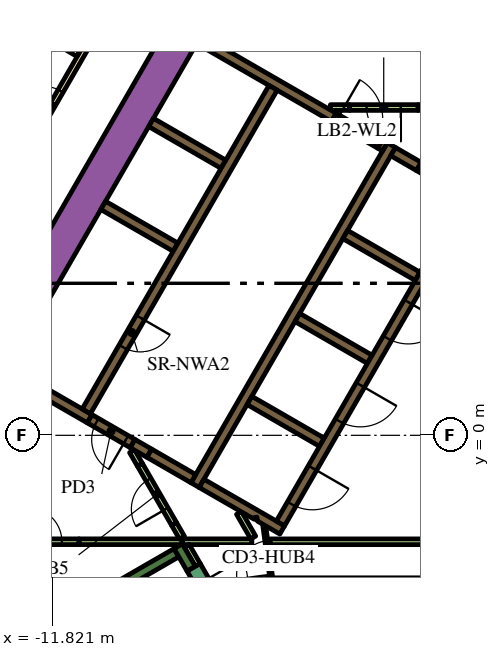
"""IFC4 building model, lengths in metres.
Left out: names, types, materials, properties, quantities, classifications, styles, units other than length and angle.
Written with IfcOpenShell. Run it as: python <this file> out.ifc"""

import sys

from ifc_helpers import new_model, si_unit, direction, frame, frame_2d, origin, place, context, subcontext, project, spatial, polyline, rectangle, outline, extrude, element, fill, save


model = new_model("IFC4")
c1 = context("Model", 3, precision=1e-05, world=origin(), true_north=direction((0.0, 1.0)))
c2 = subcontext(c1, "Body", "Model", "MODEL_VIEW")
j1 = project(units=[si_unit("LENGTHUNIT", "METRE"), si_unit("PLANEANGLEUNIT", "RADIAN")], contexts=[c1])
p1 = place(None, origin())
s1 = spatial("IfcSite", under=j1, at=p1, CompositionType="ELEMENT")
p2 = place(p1, origin())
s2 = spatial("IfcBuilding", under=s1, at=p2, CompositionType="ELEMENT")
p3 = place(p2, frame((0.0, 0.0, 54.9)))
s3 = spatial("IfcBuildingStorey", under=s2, at=p3, CompositionType="ELEMENT", Elevation=54.9)
p4 = place(p3, frame((-14.268, 0.387, 0.0), z_axis=(0.0, 0.0, 1.0), x_axis=(0.499994617707, 0.866028511231, 0.0)))
e1 = element("IfcWall", 1, at=p4, inside=s3, PredefinedType="SOLIDWALL", context=c2, shape_type="SweptSolid", body=[
    extrude(rectangle(XDim=18.817, YDim=0.9, at=frame_2d((9.409, 0.0))), origin(), (0.0, 0.0, 1.0), 3.9),
])
p5 = place(p3, frame((-12.134, -11.883, 0.0), z_axis=(0.0, 0.0, 1.0), x_axis=(-0.500005339912, 0.866022320763, 0.0)))
e2 = element("IfcWall", 2, at=p5, inside=s3, PredefinedType="SOLIDWALL", context=c2, shape_type="SweptSolid", body=[
    extrude(rectangle(XDim=9.488, YDim=0.9, at=frame_2d((4.744, 0.0))), origin(), (0.0, 0.0, 1.0), 3.9),
])
p6 = place(p3, frame((-14.44, -6.49, 0.0), z_axis=(0.0, 0.0, 1.0), x_axis=(0.866022966069, 0.500004222222, 0.0)))
e3 = element("IfcWall", 3, at=p6, inside=s3, PredefinedType="SOLIDWALL", context=c2, shape_type="SweptSolid", body=[
    extrude(rectangle(XDim=6.8, YDim=0.25, at=frame_2d((3.4, 0.0))), origin(), (0.0, 0.0, 1.0), 3.9),
])
p7 = place(p3, frame((-8.163, -3.511, 0.0), z_axis=(0.0, 0.0, 1.0), x_axis=(-0.500206266495, 0.865906283012, 0.0)))
e4 = element("IfcWall", 4, at=p7, inside=s3, PredefinedType="SOLIDWALL", context=c2, shape_type="SweptSolid", body=[
    extrude(rectangle(XDim=0.684, YDim=0.25, at=frame_2d((0.342, 0.0))), origin(), (0.0, 0.0, 1.0), 3.9),
])
p8 = place(p3, frame((-8.06, -1.311, 0.0), z_axis=(0.0, 0.0, 1.0), x_axis=(0.50000273126, 0.866023826885, 0.0)))
e5 = element("IfcWall", 5, at=p8, inside=s3, PredefinedType="SOLIDWALL", context=c2, shape_type="SweptSolid", body=[
    extrude(rectangle(XDim=10.33, YDim=0.25, at=frame_2d((5.165, 0.0))), origin(), (0.0, 0.0, 1.0), 3.9),
])
p9 = place(p3, frame((-1.819, 6.87, 0.0), z_axis=(0.0, 0.0, 1.0), x_axis=(-0.866294599386, 0.499533449405, 0.0)))
e6 = element("IfcWall", 6, at=p9, inside=s3, PredefinedType="SOLIDWALL", context=c2, shape_type="SweptSolid", body=[
    extrude(rectangle(XDim=0.41, YDim=0.25, at=frame_2d((0.205, 0.0))), origin(), (0.0, 0.0, 1.0), 3.9),
])
p10 = place(p3, frame((-2.849, 7.465, 0.0), z_axis=(0.0, 0.0, 1.0), x_axis=(0.865955664968, -0.500120771724, 0.0)))
e7 = element("IfcWall", 7, at=p10, inside=s3, PredefinedType="SOLIDWALL", context=c2, shape_type="SweptSolid", body=[
    extrude(rectangle(XDim=0.778, YDim=0.25, at=frame_2d((0.389, 0.0))), origin(), (0.0, 0.0, 1.0), 3.9),
])
for number, where, z_axis, x_axis in (
    (8, (-2.204, 4.182, 0.0), (0.0, 0.0, 1.0), (-0.866, 0.5, 0.0)),
    (9, (-5.369, 3.1, 0.0), (0.0, 0.0, 1.0), (0.866, -0.5, 0.0)),
    (10, (-4.724, -0.182, 0.0), (0.0, 0.0, 1.0), (-0.866, 0.5, 0.0)),
):
    element("IfcWall", number, at=place(p3, frame(where, z_axis=z_axis, x_axis=x_axis)), inside=s3, PredefinedType="SOLIDWALL", context=c2, shape_type="SweptSolid", body=[
        extrude(rectangle(XDim=2.2, YDim=0.25, at=frame_2d((1.1, 0.0))), origin(), (0.0, 0.0, 1.0), 3.9),
    ])
p11 = place(p3, origin())
e11 = element("IfcWall", 11, at=p11, inside=s3, PredefinedType="SOLIDWALL", context=c2, shape_type="SweptSolid", body=[
    extrude(outline(polyline([(-5.922, -2.257), (-5.922, -2.257), (-5.705, -2.382), (-5.83, -2.598), (-6.418, -2.258), (-6.433, -2.153), (-6.433, -2.153), (-6.433, -2.153), (-6.508, -2.163), (-6.508, -2.163), (-6.508, -2.163), (-6.501, -2.21), (-7.952, -1.373), (-7.827, -1.156), (-5.922, -2.257)])), origin(), (0.0, 0.0, 1.0), 3.9),
])
p12 = place(p3, frame((-9.708, -0.215, 0.0), z_axis=(0.0, 0.0, 1.0), x_axis=(0.866113839764, -0.499846793097, 0.0)))
e12 = element("IfcWall", 12, at=p12, inside=s3, PredefinedType="SOLIDWALL", context=c2, shape_type="SweptSolid", body=[
    extrude(rectangle(XDim=0.51, YDim=0.25, at=frame_2d((0.255, 0.0))), origin(), (0.0, 0.0, 1.0), 3.9),
])
p13 = place(p3, frame((-12.999, 1.685, 0.0), z_axis=(0.0, 0.0, 1.0), x_axis=(0.865996765544, -0.500049599607, 0.0)))
e13 = element("IfcWall", 13, at=p13, inside=s3, PredefinedType="SOLIDWALL", context=c2, shape_type="SweptSolid", body=[
    extrude(rectangle(XDim=2.498, YDim=0.25, at=frame_2d((1.249, 0.0))), origin(), (0.0, 0.0, 1.0), 3.9),
])
p14 = place(p3, frame((-9.265, -0.471, 0.0), z_axis=(0.0, 0.0, 1.0), x_axis=(0.865954634268, -0.500122556369, 0.0)))
e14 = element("IfcWall", 14, at=p14, inside=s3, PredefinedType="SOLIDWALL", context=c2, shape_type="SweptSolid", body=[
    extrude(rectangle(XDim=1.338, YDim=0.25, at=frame_2d((0.669, 0.0))), origin(), (0.0, 0.0, 1.0), 3.9),
])
e15 = element("IfcWall", 15, at=p11, inside=s3, PredefinedType="SOLIDWALL", context=c2, shape_type="SweptSolid", body=[
    extrude(outline(polyline([(-3.128, 7.481), (-3.259, 7.557), (-3.134, 7.773), (-3.003, 7.698), (-3.128, 7.481)])), origin(), (0.0, 0.0, 1.0), 3.9),
])
for number, where, z_axis, x_axis in (
    (16, (-8.574, 4.95, 0.0), (0.0, 0.0, 1.0), (-0.866, 0.5, 0.0)),
    (17, (-7.314, 7.132, 0.0), (0.0, 0.0, 1.0), (-0.866, 0.5, 0.0)),
):
    element("IfcWall", number, at=place(p3, frame(where, z_axis=z_axis, x_axis=x_axis)), inside=s3, PredefinedType="SOLIDWALL", context=c2, shape_type="SweptSolid", body=[
        extrude(rectangle(XDim=2.2, YDim=0.25, at=frame_2d((1.1, 0.0))), origin(), (0.0, 0.0, 1.0), 3.9),
    ])
p15 = place(p3, frame((-7.959, 10.415, 0.0), z_axis=(0.0, 0.0, 1.0), x_axis=(0.866020958405, -0.500007699544, 0.0)))
e18 = element("IfcWall", 18, at=p15, inside=s3, PredefinedType="SOLIDWALL", context=c2, shape_type="SweptSolid", body=[
    extrude(rectangle(XDim=4.1, YDim=0.25, at=frame_2d((2.05, 0.0))), origin(), (0.0, 0.0, 1.0), 3.9),
])
p16 = place(p3, frame((-8.395, -2.8, 0.0), z_axis=(0.0, 0.0, 1.0), x_axis=(1.0, 0.0, 0.0)))
e19 = element("IfcWall", 19, at=p16, inside=s3, PredefinedType="PARTITIONING", context=c2, shape_type="SweptSolid", body=[
    extrude(rectangle(XDim=1.828, YDim=0.15, at=frame_2d((0.914, 0.0))), origin(), (0.0, 0.0, 1.0), 2.75),
])
p17 = place(p3, frame((-11.115, -2.8, 0.0), z_axis=(0.0, 0.0, 1.0), x_axis=(1.0, 0.0, 0.0)))
e20 = element("IfcWall", 20, at=p17, inside=s3, PredefinedType="PARTITIONING", context=c2, shape_type="SweptSolid", body=[
    extrude(rectangle(XDim=2.708, YDim=0.15, at=frame_2d((1.354, 0.0))), origin(), (0.0, 0.0, 1.0), 2.75),
])
p18 = place(p3, frame((-6.531, -2.689, 0.0), z_axis=(0.0, 0.0, 1.0), x_axis=(-0.499967446111, 0.866044197965, 0.0)))
e21 = element("IfcWall", 21, at=p18, inside=s3, PredefinedType="PARTITIONING", context=c2, shape_type="SweptSolid", body=[
    extrude(rectangle(XDim=0.748, YDim=0.15, at=frame_2d((0.374, 0.0))), origin(), (0.0, 0.0, 1.0), 2.75),
])
p19 = place(p3, frame((-7.99, -3.412, 0.0), z_axis=(0.0, 0.0, 1.0), x_axis=(-0.500193841991, 0.86591346013, 0.0)))
e22 = element("IfcWall", 22, at=p19, inside=s3, PredefinedType="PARTITIONING", context=c2, shape_type="SweptSolid", body=[
    extrude(rectangle(XDim=0.583, YDim=0.15, at=frame_2d((0.292, 0.0))), origin(), (0.0, 0.0, 1.0), 2.75),
])
p20 = place(p3, frame((-8.612, -2.333, 0.0), z_axis=(0.0, 0.0, 1.0), x_axis=(0.500248216681, -0.86588204838, 0.0)))
e23 = element("IfcWall", 23, at=p20, inside=s3, PredefinedType="PARTITIONING", context=c2, shape_type="SweptSolid", body=[
    extrude(rectangle(XDim=0.415, YDim=0.15, at=frame_2d((0.208, 0.0))), origin(), (0.0, 0.0, 1.0), 2.75),
])
p21 = place(p3, frame((-6.086, -2.801, 0.0), z_axis=(0.0, 0.0, 1.0), x_axis=(1.0, 0.0, 0.0)))
e24 = element("IfcWall", 24, at=p21, inside=s3, PredefinedType="PARTITIONING", context=c2, shape_type="SweptSolid", body=[
    extrude(rectangle(XDim=7.524, YDim=0.15, at=frame_2d((3.762, 0.0))), origin(), (0.0, 0.0, 1.0), 2.75),
])
p22 = place(p3, frame((-9.512, -0.775, 0.0), z_axis=(0.0, 0.0, 1.0), x_axis=(-0.500080620599, 0.865978852456, 0.0)))
e25 = element("IfcWall", 25, at=p22, inside=s3, PredefinedType="PARTITIONING", context=c2, shape_type="SweptSolid", body=[
    extrude(rectangle(XDim=0.413, YDim=0.15, at=frame_2d((0.207, 0.0))), origin(), (0.0, 0.0, 1.0), 2.75),
])
p23 = place(p3, frame((-3.997, 8.625, 0.0), z_axis=(0.0, 0.0, 1.0), x_axis=(-1.0, 0.0, 0.0)))
e26 = element("IfcWall", 26, at=p23, inside=s3, PredefinedType="PARTITIONING", context=c2, shape_type="SweptSolid", body=[
    extrude(rectangle(XDim=0.502, YDim=0.15, at=frame_2d((0.251, 0.0))), origin(), (0.0, 0.0, 1.0), 2.75),
])
p24 = place(p3, frame((-2.196, 8.625, 0.0), z_axis=(0.0, 0.0, 1.0), x_axis=(1.0, 0.0, 0.0)))
e27 = element("IfcWall", 27, at=p24, inside=s3, PredefinedType="PARTITIONING", context=c2, shape_type="SweptSolid", body=[
    extrude(rectangle(XDim=1.146, YDim=0.15, at=frame_2d((0.573, 0.0))), origin(), (0.0, 0.0, 1.0), 2.75),
])
p25 = place(p3, frame((-6.008, 9.144, 0.0), z_axis=(0.0, 0.0, 1.0), x_axis=(-0.500006956611, -0.866021387346, 0.0)))
e28 = element("IfcWall", 28, at=p25, inside=s3, PredefinedType="SOLIDWALL", context=c2, shape_type="SweptSolid", body=[
    extrude(rectangle(XDim=9.83, YDim=0.25, at=frame_2d((4.915, 0.0))), origin(), (0.0, 0.0, 1.0), 3.9),
])
p26 = place(p25, frame((6.985, 0.0, 0.0)))
e29 = element("IfcOpeningElement", 29, at=p26, cuts=e28, PredefinedType="OPENING", context=c2, shape_type="SweptSolid", body=[
    extrude(rectangle(XDim=0.9, YDim=2.1, at=frame_2d((0.45, 1.05))), frame((0.0, 0.135, 0.0), z_axis=(0.0, -1.0, 0.0), x_axis=(1.0, 0.0, 0.0)), (0.0, 0.0, 1.0), 0.27),
])
p27 = place(p3, frame((-0.898, 6.194, 0.0), z_axis=(0.0, 0.0, 1.0), x_axis=(-0.499996202215, -0.866027596426, 0.0)))
e30 = element("IfcWall", 30, at=p27, inside=s3, PredefinedType="SOLIDWALL", context=c2, shape_type="SweptSolid", body=[
    extrude(rectangle(XDim=9.83, YDim=0.25, at=frame_2d((4.915, 0.0))), origin(), (0.0, 0.0, 1.0), 3.9),
])
p28 = place(p27, frame((0.585, 0.0, 0.0)))
e31 = element("IfcOpeningElement", 31, at=p28, cuts=e30, PredefinedType="OPENING", context=c2, shape_type="SweptSolid", body=[
    extrude(rectangle(XDim=1.1, YDim=2.1, at=frame_2d((0.55, 1.05))), frame((0.0, 0.135, 0.0), z_axis=(0.0, -1.0, 0.0), x_axis=(1.0, 0.0, 0.0)), (0.0, 0.0, 1.0), 0.27),
])
p29 = place(p27, frame((3.105, 0.0, 0.0)))
e32 = element("IfcOpeningElement", 32, at=p29, cuts=e30, PredefinedType="OPENING", context=c2, shape_type="SweptSolid", body=[
    extrude(rectangle(XDim=1.1, YDim=2.1, at=frame_2d((0.55, 1.05))), frame((0.0, 0.135, 0.0), z_axis=(0.0, -1.0, 0.0), x_axis=(1.0, 0.0, 0.0)), (0.0, 0.0, 1.0), 0.27),
])
p30 = place(p27, frame((5.625, 0.0, 0.0)))
e33 = element("IfcOpeningElement", 33, at=p30, cuts=e30, PredefinedType="OPENING", context=c2, shape_type="SweptSolid", body=[
    extrude(rectangle(XDim=1.1, YDim=2.1, at=frame_2d((0.55, 1.05))), frame((0.0, 0.135, 0.0), z_axis=(0.0, -1.0, 0.0), x_axis=(1.0, 0.0, 0.0)), (0.0, 0.0, 1.0), 0.27),
])
p31 = place(p27, frame((8.145, 0.0, 0.0)))
e34 = element("IfcOpeningElement", 34, at=p31, cuts=e30, PredefinedType="OPENING", context=c2, shape_type="SweptSolid", body=[
    extrude(rectangle(XDim=1.1, YDim=2.1, at=frame_2d((0.55, 1.05))), frame((0.0, 0.135, 0.0), z_axis=(0.0, -1.0, 0.0), x_axis=(1.0, 0.0, 0.0)), (0.0, 0.0, 1.0), 0.27),
])
p32 = place(p3, frame((-2.196, 8.625, 0.0), z_axis=(0.0, 0.0, 1.0), x_axis=(-1.0, 0.0, 0.0)))
e35 = element("IfcWall", 35, at=p32, inside=s3, PredefinedType="PARTITIONING", context=c2, shape_type="SweptSolid", body=[
    extrude(rectangle(XDim=1.8, YDim=0.15, at=frame_2d((0.9, 0.0))), origin(), (0.0, 0.0, 1.0), 2.75),
])
p33 = place(p32, frame((0.45, 0.0, 0.0)))
e36 = element("IfcOpeningElement", 36, at=p33, cuts=e35, PredefinedType="OPENING", context=c2, shape_type="SweptSolid", body=[
    extrude(rectangle(XDim=0.9, YDim=2.1, at=frame_2d((0.45, 1.05))), frame((0.0, 0.085, 0.0), z_axis=(0.0, -1.0, 0.0), x_axis=(1.0, 0.0, 0.0)), (0.0, 0.0, 1.0), 0.17),
])
p34 = place(p3, frame((-8.098, -3.474, 0.0), z_axis=(0.0, 0.0, 1.0), x_axis=(0.49994051562, -0.866059744384, 0.0)))
e37 = element("IfcWall", 37, at=p34, inside=s3, PredefinedType="SOLIDWALL", context=c2, shape_type="SweptSolid", body=[
    extrude(rectangle(XDim=2.1, YDim=0.4, at=frame_2d((1.05, 0.0))), origin(), (0.0, 0.0, 1.0), 3.9),
])
p35 = place(p34, frame((0.45, 0.0, 0.0)))
e38 = element("IfcOpeningElement", 38, at=p35, cuts=e37, PredefinedType="OPENING", context=c2, shape_type="SweptSolid", body=[
    extrude(rectangle(XDim=1.2, YDim=2.1, at=frame_2d((0.6, 1.05))), frame((0.0, 0.21, 0.0), z_axis=(0.0, -1.0, 0.0), x_axis=(1.0, 0.0, 0.0)), (0.0, 0.0, 1.0), 0.42),
])
p36 = place(p3, frame((-9.708, -0.215, 0.0), z_axis=(0.0, 0.0, 1.0), x_axis=(-0.866004217611, 0.500036693733, 0.0)))
e39 = element("IfcWall", 39, at=p36, inside=s3, PredefinedType="SOLIDWALL", context=c2, shape_type="SweptSolid", body=[
    extrude(rectangle(XDim=1.3, YDim=0.25, at=frame_2d((0.65, 0.0))), origin(), (0.0, 0.0, 1.0), 3.9),
])
p37 = place(p36, frame((0.2, 0.0, 0.0)))
e40 = element("IfcOpeningElement", 40, at=p37, cuts=e39, PredefinedType="OPENING", context=c2, shape_type="SweptSolid", body=[
    extrude(rectangle(XDim=0.9, YDim=2.1, at=frame_2d((0.45, 1.05))), frame((0.0, 0.135, 0.0), z_axis=(0.0, -1.0, 0.0), x_axis=(1.0, 0.0, 0.0)), (0.0, 0.0, 1.0), 0.27),
])
p38 = place(p3, frame((-5.995, -4.213, 0.0), z_axis=(0.0, 0.0, 1.0), x_axis=(-0.132072335448, 0.991240081014, 0.0)))
e41 = element("IfcWall", 41, at=p38, inside=s3, PredefinedType="PARTITIONING", context=c2, shape_type="SweptSolid", body=[
    extrude(rectangle(XDim=2.1, YDim=0.076, at=frame_2d((1.05, 0.0))), origin(), (0.0, 0.0, 1.0), 2.75),
])
p39 = place(p38, frame((0.55, 0.0, 0.0)))
e42 = element("IfcOpeningElement", 42, at=p39, cuts=e41, PredefinedType="OPENING", context=c2, shape_type="SweptSolid", body=[
    extrude(rectangle(XDim=0.9, YDim=2.1, at=frame_2d((0.45, 1.05))), frame((0.0, 0.048, 0.0), z_axis=(0.0, -1.0, 0.0), x_axis=(1.0, 0.0, 0.0)), (0.0, 0.0, 1.0), 0.096),
])
p40 = place(p3, frame((-4.409, 8.365, 0.0), z_axis=(0.0, 0.0, 1.0), x_axis=(0.866034573852, -0.49998411664, 0.0)))
e43 = element("IfcWall", 43, at=p40, inside=s3, PredefinedType="SOLIDWALL", context=c2, shape_type="SweptSolid", body=[
    extrude(rectangle(XDim=1.4, YDim=0.25, at=frame_2d((0.7, 0.0))), origin(), (0.0, 0.0, 1.0), 3.9),
])
p41 = place(p40, frame((0.1, 0.0, 0.0)))
e44 = element("IfcOpeningElement", 44, at=p41, cuts=e43, PredefinedType="OPENING", context=c2, shape_type="SweptSolid", body=[
    extrude(rectangle(XDim=1.2, YDim=2.1, at=frame_2d((0.6, 1.05))), frame((0.0, 0.135, 0.0), z_axis=(0.0, -1.0, 0.0), x_axis=(1.0, 0.0, 0.0)), (0.0, 0.0, 1.0), 0.27),
])
p42 = place(p3, frame((-12.915, -2.8, 0.0), z_axis=(0.0, 0.0, 1.0), x_axis=(1.0, 0.0, 0.0)))
e45 = element("IfcWall", 45, at=p42, inside=s3, PredefinedType="PARTITIONING", context=c2, shape_type="SweptSolid", body=[
    extrude(rectangle(XDim=1.8, YDim=0.15, at=frame_2d((0.9, 0.0))), origin(), (0.0, 0.0, 1.0), 2.75),
])
p43 = place(p42, frame((0.45, 0.0, 0.0)))
e46 = element("IfcOpeningElement", 46, at=p43, cuts=e45, PredefinedType="OPENING", context=c2, shape_type="SweptSolid", body=[
    extrude(rectangle(XDim=0.9, YDim=2.1, at=frame_2d((0.45, 1.05))), frame((0.0, 0.085, 0.0), z_axis=(0.0, -1.0, 0.0), x_axis=(1.0, 0.0, 0.0)), (0.0, 0.0, 1.0), 0.17),
])
p44 = place(p3, frame((-8.612, -2.333, 0.0), z_axis=(0.0, 0.0, 1.0), x_axis=(-0.499961193289, 0.866047807691, 0.0)))
e47 = element("IfcWall", 47, at=p44, inside=s3, PredefinedType="PARTITIONING", context=c2, shape_type="SweptSolid", body=[
    extrude(rectangle(XDim=1.8, YDim=0.15, at=frame_2d((0.9, 0.0))), origin(), (0.0, 0.0, 1.0), 2.75),
])
p45 = place(p44, frame((0.45, 0.0, 0.0)))
e48 = element("IfcOpeningElement", 48, at=p45, cuts=e47, PredefinedType="OPENING", context=c2, shape_type="SweptSolid", body=[
    extrude(rectangle(XDim=0.9, YDim=2.1, at=frame_2d((0.45, 1.05))), frame((0.0, 0.085, 0.0), z_axis=(0.0, -1.0, 0.0), x_axis=(1.0, 0.0, 0.0)), (0.0, 0.0, 1.0), 0.17),
])
p46 = place(p3, frame((-19.081, -3.9, 0.0), z_axis=(0.0, 0.0, 1.0), x_axis=(0.499998313975, 0.866026377209, 0.0)))
e49 = element("IfcWall", 49, at=p46, inside=s3, PredefinedType="PARTITIONING", context=c2, shape_type="SweptSolid", body=[
    extrude(rectangle(XDim=25.766, YDim=0.15, at=frame_2d((12.883, 0.0))), origin(), (0.0, 0.0, 1.0), 2.75),
])
p47 = place(p46, frame((22.445, 0.0, 0.0)))
e50 = element("IfcOpeningElement", 50, at=p47, cuts=e49, PredefinedType="OPENING", context=c2, shape_type="SweptSolid", body=[
    extrude(rectangle(XDim=1.0, YDim=2.1, at=frame_2d((0.5, 1.05))), frame((0.0, 0.085, 0.0), z_axis=(0.0, -1.0, 0.0), x_axis=(1.0, 0.0, 0.0)), (0.0, 0.0, 1.0), 0.17),
])
p48 = place(p46, frame((21.138, 0.0, 0.0)))
e51 = element("IfcOpeningElement", 51, at=p48, cuts=e49, PredefinedType="OPENING", context=c2, shape_type="SweptSolid", body=[
    extrude(rectangle(XDim=1.0, YDim=2.1, at=frame_2d((0.5, 1.05))), frame((0.0, 0.085, 0.0), z_axis=(0.0, -1.0, 0.0), x_axis=(1.0, 0.0, 0.0)), (0.0, 0.0, 1.0), 0.17),
])
p49 = place(p46, frame((14.066, 0.0, 0.0)))
e52 = element("IfcOpeningElement", 52, at=p49, cuts=e49, PredefinedType="OPENING", context=c2, shape_type="SweptSolid", body=[
    extrude(rectangle(XDim=0.9, YDim=2.1, at=frame_2d((0.45, 1.05))), frame((0.0, 0.085, 0.0), z_axis=(0.0, -1.0, 0.0), x_axis=(1.0, 0.0, 0.0)), (0.0, 0.0, 1.0), 0.17),
])
p50 = place(p46, frame((11.693, 0.0, 0.0)))
e53 = element("IfcOpeningElement", 53, at=p50, cuts=e49, PredefinedType="OPENING", context=c2, shape_type="SweptSolid", body=[
    extrude(rectangle(XDim=1.0, YDim=2.1, at=frame_2d((0.5, 1.05))), frame((0.0, 0.085, 0.0), z_axis=(0.0, -1.0, 0.0), x_axis=(1.0, 0.0, 0.0)), (0.0, 0.0, 1.0), 0.17),
])
p51 = place(p3, frame((-17.856, 13.999, 0.0), z_axis=(0.0, 0.0, 1.0), x_axis=(0.861371519381, -0.507975497047, 0.0)))
e54 = element("IfcWall", 54, at=p51, inside=s3, PredefinedType="PARTITIONING", context=c2, shape_type="SweptSolid", body=[
    extrude(rectangle(XDim=7.804, YDim=0.15, at=frame_2d((3.902, 0.0))), origin(), (0.0, 0.0, 1.0), 2.75),
])
p52 = place(p26, origin())
e55 = element("IfcDoor", 55, at=p52, inside=s3, OperationType="SINGLE_SWING_LEFT", PredefinedType="DOOR", context=c2, shape_type="SweptSolid", body=[
    extrude(rectangle(XDim=0.9, YDim=2.1, at=frame_2d((0.45, 1.05))), frame((0.0, 0.025, 0.0), z_axis=(0.0, -1.0, 0.0), x_axis=(1.0, 0.0, 0.0)), (0.0, 0.0, 1.0), 0.05),
])
fill(e29, e55)
p53 = place(p29, origin())
e56 = element("IfcDoor", 56, at=p53, inside=s3, OperationType="DOUBLE_DOOR_SLIDING", PredefinedType="DOOR", context=c2, shape_type="SweptSolid", body=[
    extrude(rectangle(XDim=1.1, YDim=2.1, at=frame_2d((0.55, 1.05))), frame((0.0, 0.025, 0.0), z_axis=(0.0, -1.0, 0.0), x_axis=(1.0, 0.0, 0.0)), (0.0, 0.0, 1.0), 0.05),
])
fill(e32, e56)
p54 = place(p30, origin())
e57 = element("IfcDoor", 57, at=p54, inside=s3, OperationType="DOUBLE_DOOR_SLIDING", PredefinedType="DOOR", context=c2, shape_type="SweptSolid", body=[
    extrude(rectangle(XDim=1.1, YDim=2.1, at=frame_2d((0.55, 1.05))), frame((0.0, 0.025, 0.0), z_axis=(0.0, -1.0, 0.0), x_axis=(1.0, 0.0, 0.0)), (0.0, 0.0, 1.0), 0.05),
])
fill(e33, e57)
p55 = place(p31, origin())
e58 = element("IfcDoor", 58, at=p55, inside=s3, OperationType="DOUBLE_DOOR_SLIDING", PredefinedType="DOOR", context=c2, shape_type="SweptSolid", body=[
    extrude(rectangle(XDim=1.1, YDim=2.1, at=frame_2d((0.55, 1.05))), frame((0.0, 0.025, 0.0), z_axis=(0.0, -1.0, 0.0), x_axis=(1.0, 0.0, 0.0)), (0.0, 0.0, 1.0), 0.05),
])
fill(e34, e58)
p56 = place(p33, origin())
e59 = element("IfcDoor", 59, at=p56, inside=s3, OperationType="SINGLE_SWING_LEFT", PredefinedType="DOOR", context=c2, shape_type="SweptSolid", body=[
    extrude(rectangle(XDim=0.9, YDim=2.1, at=frame_2d((0.45, 1.05))), frame((0.0, 0.025, 0.0), z_axis=(0.0, -1.0, 0.0), x_axis=(1.0, 0.0, 0.0)), (0.0, 0.0, 1.0), 0.05),
])
fill(e36, e59)
p57 = place(p37, origin())
e60 = element("IfcDoor", 60, at=p57, inside=s3, OperationType="SINGLE_SWING_LEFT", PredefinedType="DOOR", context=c2, shape_type="SweptSolid", body=[
    extrude(rectangle(XDim=0.9, YDim=2.1, at=frame_2d((0.45, 1.05))), frame((0.0, 0.025, 0.0), z_axis=(0.0, -1.0, 0.0), x_axis=(1.0, 0.0, 0.0)), (0.0, 0.0, 1.0), 0.05),
])
fill(e40, e60)
p58 = place(p39, origin())
e61 = element("IfcDoor", 61, at=p58, inside=s3, OperationType="SINGLE_SWING_LEFT", PredefinedType="DOOR", context=c2, shape_type="SweptSolid", body=[
    extrude(rectangle(XDim=0.9, YDim=2.1, at=frame_2d((0.45, 1.05))), frame((0.0, 0.025, 0.0), z_axis=(0.0, -1.0, 0.0), x_axis=(1.0, 0.0, 0.0)), (0.0, 0.0, 1.0), 0.05),
])
fill(e42, e61)
p59 = place(p41, origin())
e62 = element("IfcDoor", 62, at=p59, inside=s3, OperationType="SINGLE_SWING_LEFT", PredefinedType="DOOR", context=c2, shape_type="SweptSolid", body=[
    extrude(rectangle(XDim=1.2, YDim=2.1, at=frame_2d((0.6, 1.05))), frame((0.0, 0.025, 0.0), z_axis=(0.0, -1.0, 0.0), x_axis=(1.0, 0.0, 0.0)), (0.0, 0.0, 1.0), 0.05),
])
fill(e44, e62)
p60 = place(p43, origin())
e63 = element("IfcDoor", 63, at=p60, inside=s3, OperationType="SINGLE_SWING_LEFT", PredefinedType="DOOR", context=c2, shape_type="SweptSolid", body=[
    extrude(rectangle(XDim=0.9, YDim=2.1, at=frame_2d((0.45, 1.05))), frame((0.0, 0.025, 0.0), z_axis=(0.0, -1.0, 0.0), x_axis=(1.0, 0.0, 0.0)), (0.0, 0.0, 1.0), 0.05),
])
fill(e46, e63)
p61 = place(p45, origin())
e64 = element("IfcDoor", 64, at=p61, inside=s3, OperationType="SINGLE_SWING_LEFT", PredefinedType="DOOR", context=c2, shape_type="SweptSolid", body=[
    extrude(rectangle(XDim=0.9, YDim=2.1, at=frame_2d((0.45, 1.05))), frame((0.0, 0.025, 0.0), z_axis=(0.0, -1.0, 0.0), x_axis=(1.0, 0.0, 0.0)), (0.0, 0.0, 1.0), 0.05),
])
fill(e48, e64)
p62 = place(p49, origin())
e65 = element("IfcDoor", 65, at=p62, inside=s3, OperationType="SINGLE_SWING_RIGHT", PredefinedType="DOOR", context=c2, shape_type="SweptSolid", body=[
    extrude(rectangle(XDim=0.9, YDim=2.1, at=frame_2d((0.45, 1.05))), frame((0.0, 0.025, 0.0), z_axis=(0.0, -1.0, 0.0), x_axis=(1.0, 0.0, 0.0)), (0.0, 0.0, 1.0), 0.05),
])
fill(e52, e65)
save(model, sys.argv[1])
